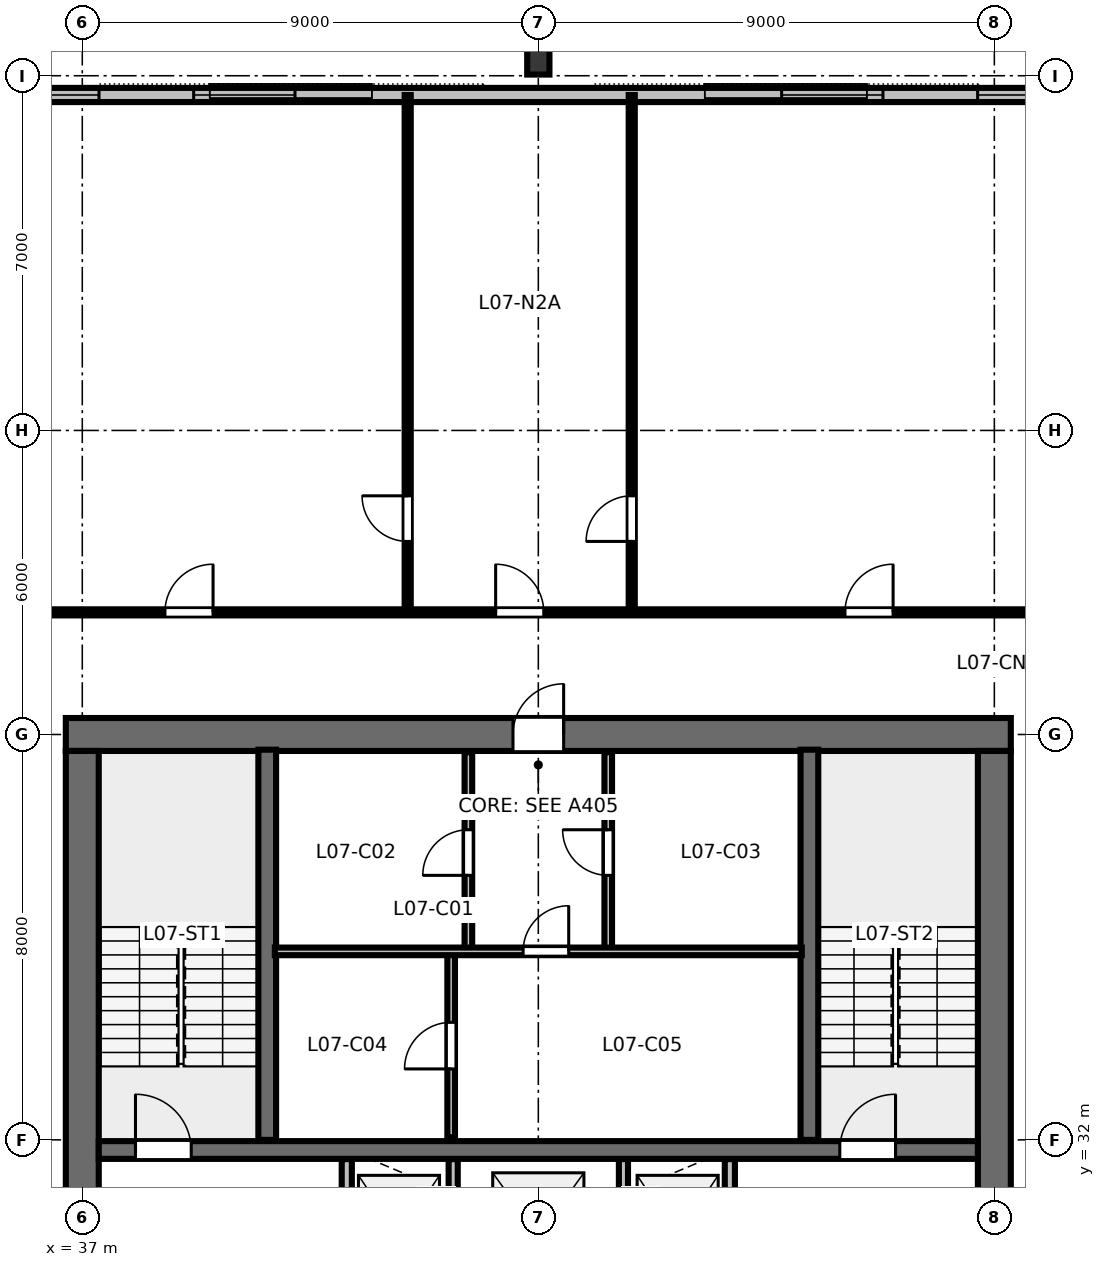
"""IFC4 building model, lengths in metres.
Left out: names, types, materials, properties, quantities, classifications, styles, units other than length and angle.
Written with IfcOpenShell. Run it as: python <this file> out.ifc"""

import sys

from ifc_helpers import new_model, si_unit, direction, frame, frame_2d, origin, origin_2d, place, context, subcontext, project, spatial, rectangle, i_section, extrude, element, fill, save


model = new_model("IFC4")
c1 = context("Model", 3, precision=1e-05, world=origin(), true_north=direction((0.0, 1.0)))
c2 = subcontext(c1, "Body", "Model", "MODEL_VIEW")
j1 = project(units=[si_unit("LENGTHUNIT", "METRE"), si_unit("PLANEANGLEUNIT", "RADIAN")], contexts=[c1])
p1 = place(None, origin())
s1 = spatial("IfcSite", under=j1, at=p1, CompositionType="ELEMENT")
p2 = place(p1, origin())
s2 = spatial("IfcBuilding", under=s1, at=p2, CompositionType="ELEMENT")
p3 = place(p2, frame((0.0, 0.0, 31.6)))
s3 = spatial("IfcBuildingStorey", under=s2, at=p3, CompositionType="ELEMENT", Elevation=31.6)
p4 = place(p3, frame((36.675, 40.0, 0.0), z_axis=(0.0, 0.0, 1.0), x_axis=(1.0, 0.0, 0.0)))
e1 = element("IfcWall", 1, at=p4, inside=s3, PredefinedType="SHEAR", context=c2, shape_type="SweptSolid", body=[
    extrude(rectangle(XDim=18.65, YDim=0.65, at=frame_2d((9.325, 0.0))), origin(), (0.0, 0.0, 1.0), 3.36),
])
p5 = place(p4, frame((8.825, 0.0, 0.0)))
e2 = element("IfcOpeningElement", 2, at=p5, cuts=e1, PredefinedType="OPENING", context=c2, shape_type="SweptSolid", body=[
    extrude(rectangle(XDim=1.0, YDim=2.15, at=frame_2d((0.5, 1.075))), frame((0.0, 0.335, 0.0), z_axis=(0.0, -1.0, 0.0), x_axis=(1.0, 0.0, 0.0)), (0.0, 0.0, 1.0), 0.67),
])
p6 = place(p3, frame((37.0, 24.325, 0.0), z_axis=(0.0, 0.0, 1.0), x_axis=(0.0, 1.0, 0.0)))
e3 = element("IfcWall", 3, at=p6, inside=s3, PredefinedType="SHEAR", context=c2, shape_type="SweptSolid", body=[
    extrude(rectangle(XDim=15.35, YDim=0.65, at=frame_2d((7.675, 0.0))), origin(), (0.0, 0.0, 1.0), 3.36),
])
p7 = place(p6, frame((5.2, 0.0, 0.0)))
e4 = element("IfcOpeningElement", 4, at=p7, cuts=e3, PredefinedType="OPENING", context=c2, shape_type="SweptSolid", body=[
    extrude(rectangle(XDim=1.15, YDim=2.15, at=frame_2d((0.575, 1.075))), frame((0.0, 0.335, 0.0), z_axis=(0.0, -1.0, 0.0), x_axis=(1.0, 0.0, 0.0)), (0.0, 0.0, 1.0), 0.67),
])
p8 = place(p3, frame((55.0, 24.325, 0.0), z_axis=(0.0, 0.0, 1.0), x_axis=(0.0, 1.0, 0.0)))
e5 = element("IfcWall", 5, at=p8, inside=s3, PredefinedType="SHEAR", context=c2, shape_type="SweptSolid", body=[
    extrude(rectangle(XDim=15.35, YDim=0.65, at=frame_2d((7.675, 0.0))), origin(), (0.0, 0.0, 1.0), 3.36),
])
p9 = place(p8, frame((5.2, 0.0, 0.0)))
e6 = element("IfcOpeningElement", 6, at=p9, cuts=e5, PredefinedType="OPENING", context=c2, shape_type="SweptSolid", body=[
    extrude(rectangle(XDim=1.15, YDim=2.15, at=frame_2d((0.575, 1.075))), frame((0.0, 0.335, 0.0), z_axis=(0.0, -1.0, 0.0), x_axis=(1.0, 0.0, 0.0)), (0.0, 0.0, 1.0), 0.67),
])
p10 = place(p3, frame((37.325, 31.8, 0.0), z_axis=(0.0, 0.0, 1.0), x_axis=(1.0, 0.0, 0.0)))
e7 = element("IfcWall", 7, at=p10, inside=s3, PredefinedType="SHEAR", context=c2, shape_type="SweptSolid", body=[
    extrude(rectangle(XDim=17.35, YDim=0.35, at=frame_2d((8.675, 0.0))), origin(), (0.0, 0.0, 1.0), 3.36),
])
p11 = place(p10, frame((0.725, 0.0, 0.0)))
e8 = element("IfcOpeningElement", 8, at=p11, cuts=e7, PredefinedType="OPENING", context=c2, shape_type="SweptSolid", body=[
    extrude(rectangle(XDim=1.1, YDim=2.15, at=frame_2d((0.55, 1.075))), frame((0.0, 0.185, 0.0), z_axis=(0.0, -1.0, 0.0), x_axis=(1.0, 0.0, 0.0)), (0.0, 0.0, 1.0), 0.37),
])
p12 = place(p10, frame((14.625, 0.0, 0.0)))
e9 = element("IfcOpeningElement", 9, at=p12, cuts=e7, PredefinedType="OPENING", context=c2, shape_type="SweptSolid", body=[
    extrude(rectangle(XDim=1.1, YDim=2.15, at=frame_2d((0.55, 1.075))), frame((0.0, 0.185, 0.0), z_axis=(0.0, -1.0, 0.0), x_axis=(1.0, 0.0, 0.0)), (0.0, 0.0, 1.0), 0.37),
])
p13 = place(p3, frame((46.0, 53.28, 0.0), z_axis=(0.0, 0.0, 1.0), x_axis=(1.0, 0.0, 0.0)))
e10 = element("IfcColumn", 10, at=p13, inside=s3, PredefinedType="COLUMN", context=c2, shape_type="SweptSolid", body=[
    extrude(i_section(OverallWidth=0.439, OverallDepth=0.514, WebThickness=0.06, FlangeThickness=0.097, FilletRadius=0.025, at=origin_2d()), origin(), (0.0, 0.0, 1.0), 3.148),
])
p14 = place(p3, frame((66.44, 52.62, 0.0), z_axis=(0.0, 0.0, 1.0), x_axis=(-1.0, 0.0, 0.0)))
e11 = element("IfcWall", 11, at=p14, inside=s3, PredefinedType="STANDARD", context=c2, shape_type="SweptSolid", body=[
    extrude(rectangle(XDim=40.88, YDim=0.28, at=frame_2d((20.44, 0.0))), origin(), (0.0, 0.0, 1.0), 3.15),
])
p15 = place(p14, frame((2.034, 0.0, 0.8)))
e12 = element("IfcOpeningElement", 12, at=p15, cuts=e11, PredefinedType="OPENING", context=c2, shape_type="SweptSolid", body=[
    extrude(rectangle(XDim=2.0, YDim=1.95, at=frame_2d((1.0, 0.975))), frame((0.0, 0.15, 0.0), z_axis=(0.0, -1.0, 0.0), x_axis=(1.0, 0.0, 0.0)), (0.0, 0.0, 1.0), 0.3),
])
p16 = place(p14, frame((5.902, 0.0, 0.8)))
e13 = element("IfcOpeningElement", 13, at=p16, cuts=e11, PredefinedType="OPENING", context=c2, shape_type="SweptSolid", body=[
    extrude(rectangle(XDim=2.0, YDim=1.95, at=frame_2d((1.0, 0.975))), frame((0.0, 0.15, 0.0), z_axis=(0.0, -1.0, 0.0), x_axis=(1.0, 0.0, 0.0)), (0.0, 0.0, 1.0), 0.3),
])
p17 = place(p14, frame((9.77, 0.0, 0.8)))
e14 = element("IfcOpeningElement", 14, at=p17, cuts=e11, PredefinedType="OPENING", context=c2, shape_type="SweptSolid", body=[
    extrude(rectangle(XDim=2.0, YDim=1.95, at=frame_2d((1.0, 0.975))), frame((0.0, 0.15, 0.0), z_axis=(0.0, -1.0, 0.0), x_axis=(1.0, 0.0, 0.0)), (0.0, 0.0, 1.0), 0.3),
])
p18 = place(p14, frame((13.638, 0.0, 0.8)))
e15 = element("IfcOpeningElement", 15, at=p18, cuts=e11, PredefinedType="OPENING", context=c2, shape_type="SweptSolid", body=[
    extrude(rectangle(XDim=2.0, YDim=1.95, at=frame_2d((1.0, 0.975))), frame((0.0, 0.15, 0.0), z_axis=(0.0, -1.0, 0.0), x_axis=(1.0, 0.0, 0.0)), (0.0, 0.0, 1.0), 0.3),
])
p19 = place(p14, frame((25.242, 0.0, 0.8)))
e16 = element("IfcOpeningElement", 16, at=p19, cuts=e11, PredefinedType="OPENING", context=c2, shape_type="SweptSolid", body=[
    extrude(rectangle(XDim=2.0, YDim=1.95, at=frame_2d((1.0, 0.975))), frame((0.0, 0.15, 0.0), z_axis=(0.0, -1.0, 0.0), x_axis=(1.0, 0.0, 0.0)), (0.0, 0.0, 1.0), 0.3),
])
p20 = place(p14, frame((29.11, 0.0, 0.8)))
e17 = element("IfcOpeningElement", 17, at=p20, cuts=e11, PredefinedType="OPENING", context=c2, shape_type="SweptSolid", body=[
    extrude(rectangle(XDim=2.0, YDim=1.95, at=frame_2d((1.0, 0.975))), frame((0.0, 0.15, 0.0), z_axis=(0.0, -1.0, 0.0), x_axis=(1.0, 0.0, 0.0)), (0.0, 0.0, 1.0), 0.3),
])
p21 = place(p14, frame((32.978, 0.0, 0.8)))
e18 = element("IfcOpeningElement", 18, at=p21, cuts=e11, PredefinedType="OPENING", context=c2, shape_type="SweptSolid", body=[
    extrude(rectangle(XDim=2.0, YDim=1.95, at=frame_2d((1.0, 0.975))), frame((0.0, 0.15, 0.0), z_axis=(0.0, -1.0, 0.0), x_axis=(1.0, 0.0, 0.0)), (0.0, 0.0, 1.0), 0.3),
])
p22 = place(p14, frame((36.846, 0.0, 0.8)))
e19 = element("IfcOpeningElement", 19, at=p22, cuts=e11, PredefinedType="OPENING", context=c2, shape_type="SweptSolid", body=[
    extrude(rectangle(XDim=2.0, YDim=1.95, at=frame_2d((1.0, 0.975))), frame((0.0, 0.15, 0.0), z_axis=(0.0, -1.0, 0.0), x_axis=(1.0, 0.0, 0.0)), (0.0, 0.0, 1.0), 0.3),
])
for number, where, z_axis, x_axis in (
    (20, (40.65, 32.0, 0.0), (0.0, 0.0, 1.0), (0.0, 1.0, 0.0)),
    (21, (51.35, 32.0, 0.0), (0.0, 0.0, 1.0), (0.0, 1.0, 0.0)),
):
    element("IfcWall", number, at=place(p3, frame(where, z_axis=z_axis, x_axis=x_axis)), inside=s3, PredefinedType="SHEAR", context=c2, shape_type="SweptSolid", body=[
        extrude(rectangle(XDim=7.7, YDim=0.35, at=frame_2d((3.85, 0.0))), origin(), (0.0, 0.0, 1.0), 3.6),
    ])
p23 = place(p3, frame((44.62, 35.72, 0.0), z_axis=(0.0, 0.0, 1.0), x_axis=(0.0, 1.0, 0.0)))
e22 = element("IfcWall", 22, at=p23, inside=s3, PredefinedType="PARTITIONING", context=c2, shape_type="SweptSolid", body=[
    extrude(rectangle(XDim=3.93, YDim=0.15, at=frame_2d((1.965, 0.0))), origin(), (0.0, 0.0, 1.0), 3.15),
])
p24 = place(p23, frame((1.5, 0.0, 0.0)))
e23 = element("IfcOpeningElement", 23, at=p24, cuts=e22, PredefinedType="OPENING", context=c2, shape_type="SweptSolid", body=[
    extrude(rectangle(XDim=0.9, YDim=2.15, at=frame_2d((0.45, 1.075))), frame((0.0, 0.085, 0.0), z_axis=(0.0, -1.0, 0.0), x_axis=(1.0, 0.0, 0.0)), (0.0, 0.0, 1.0), 0.17),
])
p25 = place(p3, frame((47.38, 35.72, 0.0), z_axis=(0.0, 0.0, 1.0), x_axis=(0.0, 1.0, 0.0)))
e24 = element("IfcWall", 24, at=p25, inside=s3, PredefinedType="PARTITIONING", context=c2, shape_type="SweptSolid", body=[
    extrude(rectangle(XDim=3.93, YDim=0.15, at=frame_2d((1.965, 0.0))), origin(), (0.0, 0.0, 1.0), 3.15),
])
p26 = place(p25, frame((1.5, 0.0, 0.0)))
e25 = element("IfcOpeningElement", 25, at=p26, cuts=e24, PredefinedType="OPENING", context=c2, shape_type="SweptSolid", body=[
    extrude(rectangle(XDim=0.9, YDim=2.15, at=frame_2d((0.45, 1.075))), frame((0.0, 0.085, 0.0), z_axis=(0.0, -1.0, 0.0), x_axis=(1.0, 0.0, 0.0)), (0.0, 0.0, 1.0), 0.17),
])
p27 = place(p3, frame((44.28, 32.05, 0.0), z_axis=(0.0, 0.0, 1.0), x_axis=(0.0, 1.0, 0.0)))
e26 = element("IfcWall", 26, at=p27, inside=s3, PredefinedType="PARTITIONING", context=c2, shape_type="SweptSolid", body=[
    extrude(rectangle(XDim=3.67, YDim=0.15, at=frame_2d((1.835, 0.0))), origin(), (0.0, 0.0, 1.0), 3.15),
])
p28 = place(p27, frame((1.35, 0.0, 0.0)))
e27 = element("IfcOpeningElement", 27, at=p28, cuts=e26, PredefinedType="OPENING", context=c2, shape_type="SweptSolid", body=[
    extrude(rectangle(XDim=0.92, YDim=2.15, at=frame_2d((0.46, 1.075))), frame((0.0, 0.085, 0.0), z_axis=(0.0, -1.0, 0.0), x_axis=(1.0, 0.0, 0.0)), (0.0, 0.0, 1.0), 0.17),
])
p29 = place(p3, frame((40.8, 35.72, 0.0), z_axis=(0.0, 0.0, 1.0), x_axis=(1.0, 0.0, 0.0)))
e28 = element("IfcWall", 28, at=p29, inside=s3, PredefinedType="PARTITIONING", context=c2, shape_type="SweptSolid", body=[
    extrude(rectangle(XDim=10.4, YDim=0.15, at=frame_2d((5.2, 0.0))), origin(), (0.0, 0.0, 1.0), 3.15),
])
p30 = place(p29, frame((4.9, 0.0, 0.0)))
e29 = element("IfcOpeningElement", 29, at=p30, cuts=e28, PredefinedType="OPENING", context=c2, shape_type="SweptSolid", body=[
    extrude(rectangle(XDim=0.9, YDim=2.15, at=frame_2d((0.45, 1.075))), frame((0.0, 0.085, 0.0), z_axis=(0.0, -1.0, 0.0), x_axis=(1.0, 0.0, 0.0)), (0.0, 0.0, 1.0), 0.17),
])
p31 = place(p3, frame((42.22, 28.58, 0.0), z_axis=(0.0, 0.0, 1.0), x_axis=(0.0, 1.0, 0.0)))
e30 = element("IfcWall", 30, at=p31, inside=s3, PredefinedType="PARTITIONING", context=c2, shape_type="SweptSolid", body=[
    extrude(rectangle(XDim=3.04, YDim=0.2, at=frame_2d((1.52, 0.0))), origin(), (0.0, 0.0, 1.0), 3.15),
])
p32 = place(p31, frame((0.95, 0.0, 0.0)))
e31 = element("IfcOpeningElement", 31, at=p32, cuts=e30, PredefinedType="OPENING", context=c2, shape_type="SweptSolid", body=[
    extrude(rectangle(XDim=1.05, YDim=2.15, at=frame_2d((0.525, 1.075))), frame((0.0, 0.11, 0.0), z_axis=(0.0, -1.0, 0.0), x_axis=(1.0, 0.0, 0.0)), (0.0, 0.0, 1.0), 0.22),
])
p33 = place(p3, frame((49.78, 28.58, 0.0), z_axis=(0.0, 0.0, 1.0), x_axis=(0.0, 1.0, 0.0)))
e32 = element("IfcWall", 32, at=p33, inside=s3, PredefinedType="PARTITIONING", context=c2, shape_type="SweptSolid", body=[
    extrude(rectangle(XDim=3.04, YDim=0.2, at=frame_2d((1.52, 0.0))), origin(), (0.0, 0.0, 1.0), 3.15),
])
p34 = place(p33, frame((0.95, 0.0, 0.0)))
e33 = element("IfcOpeningElement", 33, at=p34, cuts=e32, PredefinedType="OPENING", context=c2, shape_type="SweptSolid", body=[
    extrude(rectangle(XDim=1.05, YDim=2.15, at=frame_2d((0.525, 1.075))), frame((0.0, 0.11, 0.0), z_axis=(0.0, -1.0, 0.0), x_axis=(1.0, 0.0, 0.0)), (0.0, 0.0, 1.0), 0.22),
])
for number, where, z_axis, x_axis in (
    (34, (44.32, 28.58, 0.0), (0.0, 0.0, 1.0), (0.0, 1.0, 0.0)),
    (35, (47.68, 28.58, 0.0), (0.0, 0.0, 1.0), (0.0, 1.0, 0.0)),
):
    element("IfcWall", number, at=place(p3, frame(where, z_axis=z_axis, x_axis=x_axis)), inside=s3, PredefinedType="PARTITIONING", context=c2, shape_type="SweptSolid", body=[
        extrude(rectangle(XDim=3.04, YDim=0.18, at=frame_2d((1.52, 0.0))), origin(), (0.0, 0.0, 1.0), 3.15),
    ])
p35 = place(p3, frame((43.422, 42.41, 0.0), z_axis=(0.0, 0.0, 1.0), x_axis=(0.0, 1.0, 0.0)))
e36 = element("IfcWall", 36, at=p35, inside=s3, PredefinedType="PARTITIONING", context=c2, shape_type="SweptSolid", body=[
    extrude(rectangle(XDim=10.21, YDim=0.12, at=frame_2d((5.105, 0.0))), origin(), (0.0, 0.0, 1.0), 2.43),
])
p36 = place(p35, frame((1.4, 0.0, 0.0)))
e37 = element("IfcOpeningElement", 37, at=p36, cuts=e36, PredefinedType="OPENING", context=c2, shape_type="SweptSolid", body=[
    extrude(rectangle(XDim=0.9, YDim=2.15, at=frame_2d((0.45, 1.075))), frame((0.0, 0.07, 0.0), z_axis=(0.0, -1.0, 0.0), x_axis=(1.0, 0.0, 0.0)), (0.0, 0.0, 1.0), 0.14),
])
p37 = place(p3, frame((47.844, 42.41, 0.0), z_axis=(0.0, 0.0, 1.0), x_axis=(0.0, 1.0, 0.0)))
e38 = element("IfcWall", 38, at=p37, inside=s3, PredefinedType="PARTITIONING", context=c2, shape_type="SweptSolid", body=[
    extrude(rectangle(XDim=10.21, YDim=0.12, at=frame_2d((5.105, 0.0))), origin(), (0.0, 0.0, 1.0), 2.43),
])
p38 = place(p37, frame((1.4, 0.0, 0.0)))
e39 = element("IfcOpeningElement", 39, at=p38, cuts=e38, PredefinedType="OPENING", context=c2, shape_type="SweptSolid", body=[
    extrude(rectangle(XDim=0.9, YDim=2.15, at=frame_2d((0.45, 1.075))), frame((0.0, 0.07, 0.0), z_axis=(0.0, -1.0, 0.0), x_axis=(1.0, 0.0, 0.0)), (0.0, 0.0, 1.0), 0.14),
])
p39 = place(p3, frame((34.65, 42.41, 0.0), z_axis=(0.0, 0.0, 1.0), x_axis=(1.0, 0.0, 0.0)))
e40 = element("IfcWall", 40, at=p39, inside=s3, PredefinedType="PARTITIONING", context=c2, shape_type="SweptSolid", body=[
    extrude(rectangle(XDim=22.7, YDim=0.12, at=frame_2d((11.35, 0.0))), origin(), (0.0, 0.0, 1.0), 2.43),
])
p40 = place(p39, frame((3.981, 0.0, 0.0)))
e41 = element("IfcOpeningElement", 41, at=p40, cuts=e40, PredefinedType="OPENING", context=c2, shape_type="SweptSolid", body=[
    extrude(rectangle(XDim=0.95, YDim=2.15, at=frame_2d((0.475, 1.075))), frame((0.0, 0.07, 0.0), z_axis=(0.0, -1.0, 0.0), x_axis=(1.0, 0.0, 0.0)), (0.0, 0.0, 1.0), 0.14),
])
p41 = place(p39, frame((10.508, 0.0, 0.0)))
e42 = element("IfcOpeningElement", 42, at=p41, cuts=e40, PredefinedType="OPENING", context=c2, shape_type="SweptSolid", body=[
    extrude(rectangle(XDim=0.95, YDim=2.15, at=frame_2d((0.475, 1.075))), frame((0.0, 0.07, 0.0), z_axis=(0.0, -1.0, 0.0), x_axis=(1.0, 0.0, 0.0)), (0.0, 0.0, 1.0), 0.14),
])
p42 = place(p39, frame((17.402, 0.0, 0.0)))
e43 = element("IfcOpeningElement", 43, at=p42, cuts=e40, PredefinedType="OPENING", context=c2, shape_type="SweptSolid", body=[
    extrude(rectangle(XDim=0.95, YDim=2.15, at=frame_2d((0.475, 1.075))), frame((0.0, 0.07, 0.0), z_axis=(0.0, -1.0, 0.0), x_axis=(1.0, 0.0, 0.0)), (0.0, 0.0, 1.0), 0.14),
])
p43 = place(p17, origin())
e44 = element("IfcWindow", 44, at=p43, inside=s3, PartitioningType="SINGLE_PANEL", PredefinedType="WINDOW", context=c2, shape_type="SweptSolid", body=[
    extrude(rectangle(XDim=2.0, YDim=1.95, at=frame_2d((1.0, 0.975))), frame((0.0, 0.03, 0.0), z_axis=(0.0, -1.0, 0.0), x_axis=(1.0, 0.0, 0.0)), (0.0, 0.0, 1.0), 0.06),
])
fill(e14, e44)
p44 = place(p18, origin())
e45 = element("IfcWindow", 45, at=p44, inside=s3, PartitioningType="SINGLE_PANEL", PredefinedType="WINDOW", context=c2, shape_type="SweptSolid", body=[
    extrude(rectangle(XDim=2.0, YDim=1.95, at=frame_2d((1.0, 0.975))), frame((0.0, 0.03, 0.0), z_axis=(0.0, -1.0, 0.0), x_axis=(1.0, 0.0, 0.0)), (0.0, 0.0, 1.0), 0.06),
])
fill(e15, e45)
p45 = place(p19, origin())
e46 = element("IfcWindow", 46, at=p45, inside=s3, PartitioningType="SINGLE_PANEL", PredefinedType="WINDOW", context=c2, shape_type="SweptSolid", body=[
    extrude(rectangle(XDim=2.0, YDim=1.95, at=frame_2d((1.0, 0.975))), frame((0.0, 0.03, 0.0), z_axis=(0.0, -1.0, 0.0), x_axis=(1.0, 0.0, 0.0)), (0.0, 0.0, 1.0), 0.06),
])
fill(e16, e46)
p46 = place(p20, origin())
e47 = element("IfcWindow", 47, at=p46, inside=s3, PartitioningType="SINGLE_PANEL", PredefinedType="WINDOW", context=c2, shape_type="SweptSolid", body=[
    extrude(rectangle(XDim=2.0, YDim=1.95, at=frame_2d((1.0, 0.975))), frame((0.0, 0.03, 0.0), z_axis=(0.0, -1.0, 0.0), x_axis=(1.0, 0.0, 0.0)), (0.0, 0.0, 1.0), 0.06),
])
fill(e17, e47)
p47 = place(p11, origin())
e48 = element("IfcDoor", 48, at=p47, inside=s3, OperationType="SINGLE_SWING_LEFT", PredefinedType="DOOR", context=c2, shape_type="SweptSolid", body=[
    extrude(rectangle(XDim=1.1, YDim=2.15, at=frame_2d((0.55, 1.075))), frame((0.0, 0.025, 0.0), z_axis=(0.0, -1.0, 0.0), x_axis=(1.0, 0.0, 0.0)), (0.0, 0.0, 1.0), 0.05),
])
fill(e8, e48)
p48 = place(p12, origin())
e49 = element("IfcDoor", 49, at=p48, inside=s3, OperationType="SINGLE_SWING_RIGHT", PredefinedType="DOOR", context=c2, shape_type="SweptSolid", body=[
    extrude(rectangle(XDim=1.1, YDim=2.15, at=frame_2d((0.55, 1.075))), frame((0.0, 0.025, 0.0), z_axis=(0.0, -1.0, 0.0), x_axis=(1.0, 0.0, 0.0)), (0.0, 0.0, 1.0), 0.05),
])
fill(e9, e49)
p49 = place(p5, origin())
e50 = element("IfcDoor", 50, at=p49, inside=s3, OperationType="SINGLE_SWING_RIGHT", PredefinedType="DOOR", context=c2, shape_type="SweptSolid", body=[
    extrude(rectangle(XDim=1.0, YDim=2.15, at=frame_2d((0.5, 1.075))), frame((0.0, 0.025, 0.0), z_axis=(0.0, -1.0, 0.0), x_axis=(1.0, 0.0, 0.0)), (0.0, 0.0, 1.0), 0.05),
])
fill(e2, e50)
p50 = place(p24, origin())
e51 = element("IfcDoor", 51, at=p50, inside=s3, OperationType="SINGLE_SWING_LEFT", PredefinedType="DOOR", context=c2, shape_type="SweptSolid", body=[
    extrude(rectangle(XDim=0.9, YDim=2.15, at=frame_2d((0.45, 1.075))), frame((0.0, 0.025, 0.0), z_axis=(0.0, -1.0, 0.0), x_axis=(1.0, 0.0, 0.0)), (0.0, 0.0, 1.0), 0.05),
])
fill(e23, e51)
p51 = place(p26, origin())
e52 = element("IfcDoor", 52, at=p51, inside=s3, OperationType="SINGLE_SWING_RIGHT", PredefinedType="DOOR", context=c2, shape_type="SweptSolid", body=[
    extrude(rectangle(XDim=0.9, YDim=2.15, at=frame_2d((0.45, 1.075))), frame((0.0, 0.025, 0.0), z_axis=(0.0, -1.0, 0.0), x_axis=(1.0, 0.0, 0.0)), (0.0, 0.0, 1.0), 0.05),
])
fill(e25, e52)
p52 = place(p28, origin())
e53 = element("IfcDoor", 53, at=p52, inside=s3, OperationType="SINGLE_SWING_LEFT", PredefinedType="DOOR", context=c2, shape_type="SweptSolid", body=[
    extrude(rectangle(XDim=0.92, YDim=2.15, at=frame_2d((0.46, 1.075))), frame((0.0, 0.025, 0.0), z_axis=(0.0, -1.0, 0.0), x_axis=(1.0, 0.0, 0.0)), (0.0, 0.0, 1.0), 0.05),
])
fill(e27, e53)
p53 = place(p30, origin())
e54 = element("IfcDoor", 54, at=p53, inside=s3, OperationType="SINGLE_SWING_RIGHT", PredefinedType="DOOR", context=c2, shape_type="SweptSolid", body=[
    extrude(rectangle(XDim=0.9, YDim=2.15, at=frame_2d((0.45, 1.075))), frame((0.0, 0.025, 0.0), z_axis=(0.0, -1.0, 0.0), x_axis=(1.0, 0.0, 0.0)), (0.0, 0.0, 1.0), 0.05),
])
fill(e29, e54)
p54 = place(p36, origin())
e55 = element("IfcDoor", 55, at=p54, inside=s3, OperationType="SINGLE_SWING_RIGHT", PredefinedType="DOOR", context=c2, shape_type="SweptSolid", body=[
    extrude(rectangle(XDim=0.9, YDim=2.15, at=frame_2d((0.45, 1.075))), frame((0.0, 0.025, 0.0), z_axis=(0.0, -1.0, 0.0), x_axis=(1.0, 0.0, 0.0)), (0.0, 0.0, 1.0), 0.05),
])
fill(e37, e55)
p55 = place(p38, origin())
e56 = element("IfcDoor", 56, at=p55, inside=s3, OperationType="SINGLE_SWING_LEFT", PredefinedType="DOOR", context=c2, shape_type="SweptSolid", body=[
    extrude(rectangle(XDim=0.9, YDim=2.15, at=frame_2d((0.45, 1.075))), frame((0.0, 0.025, 0.0), z_axis=(0.0, -1.0, 0.0), x_axis=(1.0, 0.0, 0.0)), (0.0, 0.0, 1.0), 0.05),
])
fill(e39, e56)
p56 = place(p40, origin())
e57 = element("IfcDoor", 57, at=p56, inside=s3, OperationType="SINGLE_SWING_RIGHT", PredefinedType="DOOR", context=c2, shape_type="SweptSolid", body=[
    extrude(rectangle(XDim=0.95, YDim=2.15, at=frame_2d((0.475, 1.075))), frame((0.0, 0.025, 0.0), z_axis=(0.0, -1.0, 0.0), x_axis=(1.0, 0.0, 0.0)), (0.0, 0.0, 1.0), 0.05),
])
fill(e41, e57)
p57 = place(p41, origin())
e58 = element("IfcDoor", 58, at=p57, inside=s3, OperationType="SINGLE_SWING_LEFT", PredefinedType="DOOR", context=c2, shape_type="SweptSolid", body=[
    extrude(rectangle(XDim=0.95, YDim=2.15, at=frame_2d((0.475, 1.075))), frame((0.0, 0.025, 0.0), z_axis=(0.0, -1.0, 0.0), x_axis=(1.0, 0.0, 0.0)), (0.0, 0.0, 1.0), 0.05),
])
fill(e42, e58)
p58 = place(p42, origin())
e59 = element("IfcDoor", 59, at=p58, inside=s3, OperationType="SINGLE_SWING_RIGHT", PredefinedType="DOOR", context=c2, shape_type="SweptSolid", body=[
    extrude(rectangle(XDim=0.95, YDim=2.15, at=frame_2d((0.475, 1.075))), frame((0.0, 0.025, 0.0), z_axis=(0.0, -1.0, 0.0), x_axis=(1.0, 0.0, 0.0)), (0.0, 0.0, 1.0), 0.05),
])
fill(e43, e59)
save(model, sys.argv[1])
